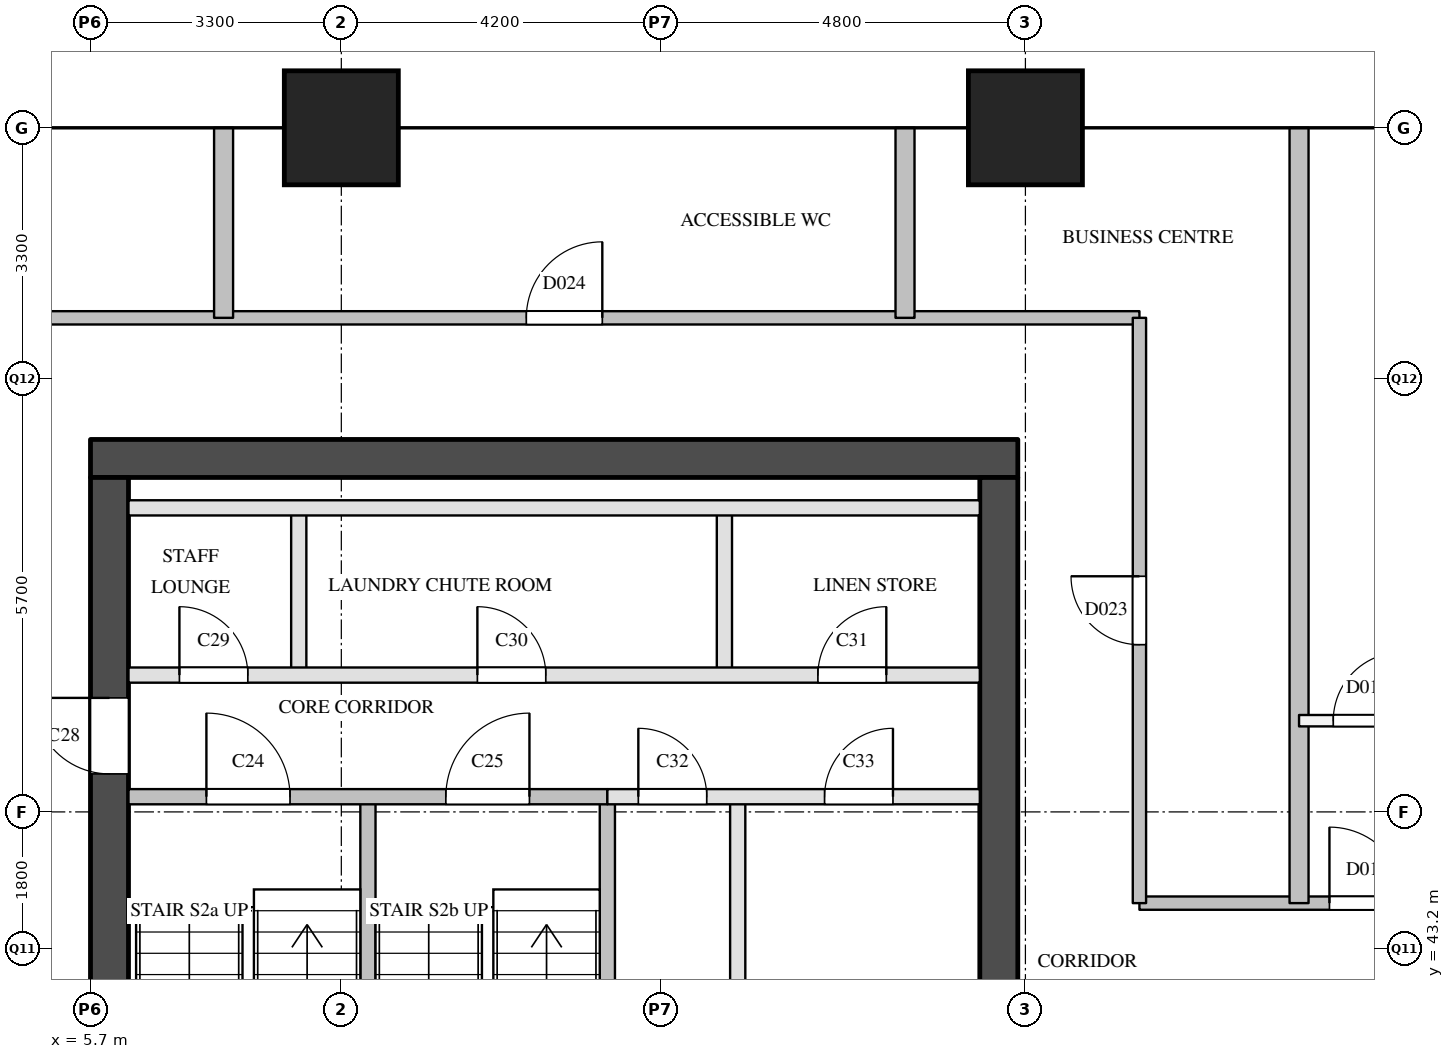
"""IFC4 building model, lengths in metres.
Left out: names, types, materials, properties, quantities, classifications, styles, units other than length and angle.
Written with IfcOpenShell. Run it as: python <this file> out.ifc"""

import sys

from ifc_helpers import new_model, si_unit, direction, frame, frame_2d, origin, origin_2d, place, context, subcontext, project, spatial, rectangle, extrude, element, fill, save


model = new_model("IFC4")
c1 = context("Model", 3, precision=1e-05, world=origin(), true_north=direction((0.0, 1.0)))
c2 = subcontext(c1, "Body", "Model", "MODEL_VIEW")
j1 = project(units=[si_unit("LENGTHUNIT", "METRE"), si_unit("PLANEANGLEUNIT", "RADIAN")], contexts=[c1])
p1 = place(None, origin())
s1 = spatial("IfcSite", under=j1, at=p1, CompositionType="ELEMENT")
p2 = place(p1, origin())
s2 = spatial("IfcBuilding", under=s1, at=p2, CompositionType="ELEMENT")
p3 = place(p2, frame((0.0, 0.0, 193.4)))
s3 = spatial("IfcBuildingStorey", under=s2, at=p3, CompositionType="ELEMENT", Elevation=193.4)
for number, where, z_axis, x_axis in (
    (1, (9.0, 54.0, 0.0), (0.0, 0.0, 1.0), (1.0, 0.0, 0.0)),
    (2, (18.0, 54.0, 0.0), (0.0, 0.0, 1.0), (1.0, 0.0, 0.0)),
):
    element("IfcColumn", number, at=place(p3, frame(where, z_axis=z_axis, x_axis=x_axis)), inside=s3, PredefinedType="COLUMN", context=c2, shape_type="SweptSolid", body=[
        extrude(rectangle(XDim=1.5, YDim=1.5, at=origin_2d()), origin(), (0.0, 0.0, 1.0), 3.9),
    ])
p4 = place(p3, frame((5.7, 49.65, 0.0), z_axis=(0.0, 0.0, 1.0), x_axis=(1.0, 0.0, 0.0)))
e3 = element("IfcWall", 3, at=p4, inside=s3, PredefinedType="SHEAR", context=c2, shape_type="SweptSolid", body=[
    extrude(rectangle(XDim=12.2, YDim=0.5, at=frame_2d((6.1, 0.0))), origin(), (0.0, 0.0, 1.0), 3.4),
])
p5 = place(p3, frame((5.95, 29.1, 0.0), z_axis=(0.0, 0.0, 1.0), x_axis=(0.0, 1.0, 0.0)))
e4 = element("IfcWall", 4, at=p5, inside=s3, PredefinedType="SHEAR", context=c2, shape_type="SweptSolid", body=[
    extrude(rectangle(XDim=20.3, YDim=0.5, at=frame_2d((10.15, 0.0))), origin(), (0.0, 0.0, 1.0), 3.4),
])
p6 = place(p5, frame((3.45, 0.0, 0.0)))
e5 = element("IfcOpeningElement", 5, at=p6, cuts=e4, PredefinedType="OPENING", context=c2, shape_type="SweptSolid", body=[
    extrude(rectangle(XDim=1.0, YDim=2.1, at=frame_2d((0.5, 1.05))), frame((0.0, 0.26, 0.0), z_axis=(0.0, -1.0, 0.0), x_axis=(1.0, 0.0, 0.0)), (0.0, 0.0, 1.0), 0.52),
])
p7 = place(p5, frame((16.4, 0.0, 0.0)))
e6 = element("IfcOpeningElement", 6, at=p7, cuts=e4, PredefinedType="OPENING", context=c2, shape_type="SweptSolid", body=[
    extrude(rectangle(XDim=1.0, YDim=2.1, at=frame_2d((0.5, 1.05))), frame((0.0, 0.26, 0.0), z_axis=(0.0, -1.0, 0.0), x_axis=(1.0, 0.0, 0.0)), (0.0, 0.0, 1.0), 0.52),
])
p8 = place(p3, frame((17.65, 29.1, 0.0), z_axis=(0.0, 0.0, 1.0), x_axis=(0.0, 1.0, 0.0)))
e7 = element("IfcWall", 7, at=p8, inside=s3, PredefinedType="SHEAR", context=c2, shape_type="SweptSolid", body=[
    extrude(rectangle(XDim=20.3, YDim=0.5, at=frame_2d((10.15, 0.0))), origin(), (0.0, 0.0, 1.0), 3.4),
])
p9 = place(p8, frame((1.25, 0.0, 0.0)))
e8 = element("IfcOpeningElement", 8, at=p9, cuts=e7, PredefinedType="OPENING", context=c2, shape_type="SweptSolid", body=[
    extrude(rectangle(XDim=0.7, YDim=2.1, at=frame_2d((0.35, 1.05))), frame((0.0, 0.26, 0.0), z_axis=(0.0, -1.0, 0.0), x_axis=(1.0, 0.0, 0.0)), (0.0, 0.0, 1.0), 0.52),
])
p10 = place(p8, frame((7.05, 0.0, 0.0)))
e9 = element("IfcOpeningElement", 9, at=p10, cuts=e7, PredefinedType="OPENING", context=c2, shape_type="SweptSolid", body=[
    extrude(rectangle(XDim=0.7, YDim=2.1, at=frame_2d((0.35, 1.05))), frame((0.0, 0.26, 0.0), z_axis=(0.0, -1.0, 0.0), x_axis=(1.0, 0.0, 0.0)), (0.0, 0.0, 1.0), 0.52),
])
p11 = place(p8, frame((3.6, 0.0, 0.0)))
e10 = element("IfcOpeningElement", 10, at=p11, cuts=e7, PredefinedType="OPENING", context=c2, shape_type="SweptSolid", body=[
    extrude(rectangle(XDim=1.8, YDim=2.1, at=frame_2d((0.9, 1.05))), frame((0.0, 0.26, 0.0), z_axis=(0.0, -1.0, 0.0), x_axis=(1.0, 0.0, 0.0)), (0.0, 0.0, 1.0), 0.52),
])
p12 = place(p3, frame((8.44, 46.8, 0.0), z_axis=(0.0, 0.0, 1.0), x_axis=(0.0, 1.0, 0.0)))
e11 = element("IfcWall", 11, at=p12, inside=s3, PredefinedType="PARTITIONING", context=c2, shape_type="SweptSolid", body=[
    extrude(rectangle(XDim=2.2, YDim=0.2, at=frame_2d((1.1, 0.0))), origin(), (0.0, 0.0, 1.0), 3.4),
])
for number, where, z_axis, x_axis in (
    (12, (9.35, 40.9, 0.0), (0.0, 0.0, 1.0), (0.0, 1.0, 0.0)),
    (13, (12.5, 40.9, 0.0), (0.0, 0.0, 1.0), (0.0, 1.0, 0.0)),
):
    element("IfcWall", number, at=place(p3, frame(where, z_axis=z_axis, x_axis=x_axis)), inside=s3, PredefinedType="SOLIDWALL", context=c2, shape_type="SweptSolid", body=[
        extrude(rectangle(XDim=4.3, YDim=0.2, at=frame_2d((2.15, 0.0))), origin(), (0.0, 0.0, 1.0), 3.4),
    ])
p13 = place(p3, frame((14.04, 46.8, 0.0), z_axis=(0.0, 0.0, 1.0), x_axis=(0.0, 1.0, 0.0)))
e14 = element("IfcWall", 14, at=p13, inside=s3, PredefinedType="PARTITIONING", context=c2, shape_type="SweptSolid", body=[
    extrude(rectangle(XDim=2.2, YDim=0.2, at=frame_2d((1.1, 0.0))), origin(), (0.0, 0.0, 1.0), 3.4),
])
p14 = place(p3, frame((14.215, 39.0, 0.0), z_axis=(0.0, 0.0, 1.0), x_axis=(0.0, 1.0, 0.0)))
e15 = element("IfcWall", 15, at=p14, inside=s3, PredefinedType="PARTITIONING", context=c2, shape_type="SweptSolid", body=[
    extrude(rectangle(XDim=6.2, YDim=0.2, at=frame_2d((3.1, 0.0))), origin(), (0.0, 0.0, 1.0), 3.4),
])
p15 = place(p3, frame((12.5, 45.2, 0.0), z_axis=(0.0, 0.0, 1.0), x_axis=(1.0, 0.0, 0.0)))
e16 = element("IfcWall", 16, at=p15, inside=s3, PredefinedType="PARTITIONING", context=c2, shape_type="SweptSolid", body=[
    extrude(rectangle(XDim=4.9, YDim=0.2, at=frame_2d((2.45, 0.0))), origin(), (0.0, 0.0, 1.0), 3.4),
])
p16 = place(p15, frame((0.407, 0.0, 0.0)))
e17 = element("IfcOpeningElement", 17, at=p16, cuts=e16, PredefinedType="OPENING", context=c2, shape_type="SweptSolid", body=[
    extrude(rectangle(XDim=0.9, YDim=2.1, at=frame_2d((0.45, 1.05))), frame((0.0, 0.11, 0.0), z_axis=(0.0, -1.0, 0.0), x_axis=(1.0, 0.0, 0.0)), (0.0, 0.0, 1.0), 0.22),
])
p17 = place(p15, frame((2.857, 0.0, 0.0)))
e18 = element("IfcOpeningElement", 18, at=p17, cuts=e16, PredefinedType="OPENING", context=c2, shape_type="SweptSolid", body=[
    extrude(rectangle(XDim=0.9, YDim=2.1, at=frame_2d((0.45, 1.05))), frame((0.0, 0.11, 0.0), z_axis=(0.0, -1.0, 0.0), x_axis=(1.0, 0.0, 0.0)), (0.0, 0.0, 1.0), 0.22),
])
p18 = place(p3, frame((6.2, 45.2, 0.0), z_axis=(0.0, 0.0, 1.0), x_axis=(1.0, 0.0, 0.0)))
e19 = element("IfcWall", 19, at=p18, inside=s3, PredefinedType="SOLIDWALL", context=c2, shape_type="SweptSolid", body=[
    extrude(rectangle(XDim=6.3, YDim=0.2, at=frame_2d((3.15, 0.0))), origin(), (0.0, 0.0, 1.0), 3.4),
])
p19 = place(p18, frame((1.025, 0.0, 0.0)))
e20 = element("IfcOpeningElement", 20, at=p19, cuts=e19, PredefinedType="OPENING", context=c2, shape_type="SweptSolid", body=[
    extrude(rectangle(XDim=1.1, YDim=2.1, at=frame_2d((0.55, 1.05))), frame((0.0, 0.11, 0.0), z_axis=(0.0, -1.0, 0.0), x_axis=(1.0, 0.0, 0.0)), (0.0, 0.0, 1.0), 0.22),
])
p20 = place(p18, frame((4.175, 0.0, 0.0)))
e21 = element("IfcOpeningElement", 21, at=p20, cuts=e19, PredefinedType="OPENING", context=c2, shape_type="SweptSolid", body=[
    extrude(rectangle(XDim=1.1, YDim=2.1, at=frame_2d((0.55, 1.05))), frame((0.0, 0.11, 0.0), z_axis=(0.0, -1.0, 0.0), x_axis=(1.0, 0.0, 0.0)), (0.0, 0.0, 1.0), 0.22),
])
p21 = place(p3, frame((6.2, 46.8, 0.0), z_axis=(0.0, 0.0, 1.0), x_axis=(1.0, 0.0, 0.0)))
e22 = element("IfcWall", 22, at=p21, inside=s3, PredefinedType="PARTITIONING", context=c2, shape_type="SweptSolid", body=[
    extrude(rectangle(XDim=11.2, YDim=0.2, at=frame_2d((5.6, 0.0))), origin(), (0.0, 0.0, 1.0), 3.4),
])
p22 = place(p21, frame((0.67, 0.0, 0.0)))
e23 = element("IfcOpeningElement", 23, at=p22, cuts=e22, PredefinedType="OPENING", context=c2, shape_type="SweptSolid", body=[
    extrude(rectangle(XDim=0.9, YDim=2.1, at=frame_2d((0.45, 1.05))), frame((0.0, 0.11, 0.0), z_axis=(0.0, -1.0, 0.0), x_axis=(1.0, 0.0, 0.0)), (0.0, 0.0, 1.0), 0.22),
])
p23 = place(p21, frame((4.59, 0.0, 0.0)))
e24 = element("IfcOpeningElement", 24, at=p23, cuts=e22, PredefinedType="OPENING", context=c2, shape_type="SweptSolid", body=[
    extrude(rectangle(XDim=0.9, YDim=2.1, at=frame_2d((0.45, 1.05))), frame((0.0, 0.11, 0.0), z_axis=(0.0, -1.0, 0.0), x_axis=(1.0, 0.0, 0.0)), (0.0, 0.0, 1.0), 0.22),
])
p24 = place(p21, frame((9.07, 0.0, 0.0)))
e25 = element("IfcOpeningElement", 25, at=p24, cuts=e22, PredefinedType="OPENING", context=c2, shape_type="SweptSolid", body=[
    extrude(rectangle(XDim=0.9, YDim=2.1, at=frame_2d((0.45, 1.05))), frame((0.0, 0.11, 0.0), z_axis=(0.0, -1.0, 0.0), x_axis=(1.0, 0.0, 0.0)), (0.0, 0.0, 1.0), 0.22),
])
p25 = place(p3, frame((6.2, 49.0, 0.0), z_axis=(0.0, 0.0, 1.0), x_axis=(1.0, 0.0, 0.0)))
e26 = element("IfcWall", 26, at=p25, inside=s3, PredefinedType="PARTITIONING", context=c2, shape_type="SweptSolid", body=[
    extrude(rectangle(XDim=11.2, YDim=0.2, at=frame_2d((5.6, 0.0))), origin(), (0.0, 0.0, 1.0), 3.4),
])
p26 = place(p3, frame((19.5, 43.8, 0.0), z_axis=(0.0, 0.0, 1.0), x_axis=(1.0, 0.0, 0.0)))
e27 = element("IfcWall", 27, at=p26, inside=s3, PredefinedType="PARTITIONING", context=c2, shape_type="SweptSolid", body=[
    extrude(rectangle(XDim=15.0, YDim=0.175, at=frame_2d((7.5, 0.0))), origin(), (0.0, 0.0, 1.0), 2.4),
])
p27 = place(p26, frame((2.5, 0.0, 0.0)))
e28 = element("IfcOpeningElement", 28, at=p27, cuts=e27, PredefinedType="OPENING", context=c2, shape_type="SweptSolid", body=[
    extrude(rectangle(XDim=1.0, YDim=2.1, at=frame_2d((0.5, 1.05))), frame((0.0, 0.097, 0.0), z_axis=(0.0, -1.0, 0.0), x_axis=(1.0, 0.0, 0.0)), (0.0, 0.0, 1.0), 0.195),
])
p28 = place(p26, frame((11.5, 0.0, 0.0)))
e29 = element("IfcOpeningElement", 29, at=p28, cuts=e27, PredefinedType="OPENING", context=c2, shape_type="SweptSolid", body=[
    extrude(rectangle(XDim=1.0, YDim=2.1, at=frame_2d((0.5, 1.05))), frame((0.0, 0.097, 0.0), z_axis=(0.0, -1.0, 0.0), x_axis=(1.0, 0.0, 0.0)), (0.0, 0.0, 1.0), 0.195),
])
p29 = place(p3, frame((4.1, 51.5, 0.0), z_axis=(0.0, 0.0, 1.0), x_axis=(1.0, 0.0, 0.0)))
e30 = element("IfcWall", 30, at=p29, inside=s3, PredefinedType="PARTITIONING", context=c2, shape_type="SweptSolid", body=[
    extrude(rectangle(XDim=15.4, YDim=0.175, at=frame_2d((7.7, 0.0))), origin(), (0.0, 0.0, 1.0), 3.4),
])
p30 = place(p29, frame((7.333, 0.0, 0.0)))
e31 = element("IfcOpeningElement", 31, at=p30, cuts=e30, PredefinedType="OPENING", context=c2, shape_type="SweptSolid", body=[
    extrude(rectangle(XDim=1.0, YDim=2.1, at=frame_2d((0.5, 1.05))), frame((0.0, 0.097, 0.0), z_axis=(0.0, -1.0, 0.0), x_axis=(1.0, 0.0, 0.0)), (0.0, 0.0, 1.0), 0.195),
])
p31 = place(p3, frame((19.5, 43.8, 0.0), z_axis=(0.0, 0.0, 1.0), x_axis=(0.0, 1.0, 0.0)))
e32 = element("IfcWall", 32, at=p31, inside=s3, PredefinedType="PARTITIONING", context=c2, shape_type="SweptSolid", body=[
    extrude(rectangle(XDim=7.7, YDim=0.175, at=frame_2d((3.85, 0.0))), origin(), (0.0, 0.0, 1.0), 3.4),
])
p32 = place(p31, frame((3.4, 0.0, 0.0)))
e33 = element("IfcOpeningElement", 33, at=p32, cuts=e32, PredefinedType="OPENING", context=c2, shape_type="SweptSolid", body=[
    extrude(rectangle(XDim=0.9, YDim=2.1, at=frame_2d((0.45, 1.05))), frame((0.0, 0.097, 0.0), z_axis=(0.0, -1.0, 0.0), x_axis=(1.0, 0.0, 0.0)), (0.0, 0.0, 1.0), 0.195),
])
p33 = place(p3, frame((21.6, 46.2, 0.0), z_axis=(0.0, 0.0, 1.0), x_axis=(1.0, 0.0, 0.0)))
e34 = element("IfcWall", 34, at=p33, inside=s3, PredefinedType="PARTITIONING", context=c2, shape_type="SweptSolid", body=[
    extrude(rectangle(XDim=1.8, YDim=0.15, at=frame_2d((0.9, 0.0))), origin(), (0.0, 0.0, 1.0), 3.4),
])
p34 = place(p33, frame((0.45, 0.0, 0.0)))
e35 = element("IfcOpeningElement", 35, at=p34, cuts=e34, PredefinedType="OPENING", context=c2, shape_type="SweptSolid", body=[
    extrude(rectangle(XDim=0.9, YDim=2.1, at=frame_2d((0.45, 1.05))), frame((0.0, 0.085, 0.0), z_axis=(0.0, -1.0, 0.0), x_axis=(1.0, 0.0, 0.0)), (0.0, 0.0, 1.0), 0.17),
])
for number, where, z_axis, x_axis in (
    (36, (7.451, 51.5, 0.0), (0.0, 0.0, 1.0), (0.0, 1.0, 0.0)),
    (37, (16.416, 51.5, 0.0), (0.0, 0.0, 1.0), (0.0, 1.0, 0.0)),
):
    element("IfcWall", number, at=place(p3, frame(where, z_axis=z_axis, x_axis=x_axis)), inside=s3, PredefinedType="PARTITIONING", context=c2, shape_type="SweptSolid", body=[
        extrude(rectangle(XDim=2.5, YDim=0.25, at=frame_2d((1.25, 0.0))), origin(), (0.0, 0.0, 1.0), 2.4),
    ])
p35 = place(p3, frame((21.6, 43.8, 0.0), z_axis=(0.0, 0.0, 1.0), x_axis=(0.0, 1.0, 0.0)))
e38 = element("IfcWall", 38, at=p35, inside=s3, PredefinedType="PARTITIONING", context=c2, shape_type="SweptSolid", body=[
    extrude(rectangle(XDim=10.2, YDim=0.25, at=frame_2d((5.1, 0.0))), origin(), (0.0, 0.0, 1.0), 2.4),
])
p36 = place(p19, origin())
e39 = element("IfcDoor", 39, at=p36, inside=s3, OperationType="SINGLE_SWING_LEFT", PredefinedType="DOOR", context=c2, shape_type="SweptSolid", body=[
    extrude(rectangle(XDim=1.1, YDim=2.1, at=frame_2d((0.55, 1.05))), frame((0.0, 0.025, 0.0), z_axis=(0.0, -1.0, 0.0), x_axis=(1.0, 0.0, 0.0)), (0.0, 0.0, 1.0), 0.05),
])
fill(e20, e39)
p37 = place(p20, origin())
e40 = element("IfcDoor", 40, at=p37, inside=s3, OperationType="SINGLE_SWING_RIGHT", PredefinedType="DOOR", context=c2, shape_type="SweptSolid", body=[
    extrude(rectangle(XDim=1.1, YDim=2.1, at=frame_2d((0.55, 1.05))), frame((0.0, 0.025, 0.0), z_axis=(0.0, -1.0, 0.0), x_axis=(1.0, 0.0, 0.0)), (0.0, 0.0, 1.0), 0.05),
])
fill(e21, e40)
p38 = place(p7, origin())
e41 = element("IfcDoor", 41, at=p38, inside=s3, OperationType="SINGLE_SWING_RIGHT", PredefinedType="DOOR", context=c2, shape_type="SweptSolid", body=[
    extrude(rectangle(XDim=1.0, YDim=2.1, at=frame_2d((0.5, 1.05))), frame((0.0, 0.025, 0.0), z_axis=(0.0, -1.0, 0.0), x_axis=(1.0, 0.0, 0.0)), (0.0, 0.0, 1.0), 0.05),
])
fill(e6, e41)
p39 = place(p22, origin())
e42 = element("IfcDoor", 42, at=p39, inside=s3, OperationType="SINGLE_SWING_LEFT", PredefinedType="DOOR", context=c2, shape_type="SweptSolid", body=[
    extrude(rectangle(XDim=0.9, YDim=2.1, at=frame_2d((0.45, 1.05))), frame((0.0, 0.025, 0.0), z_axis=(0.0, -1.0, 0.0), x_axis=(1.0, 0.0, 0.0)), (0.0, 0.0, 1.0), 0.05),
])
fill(e23, e42)
p40 = place(p23, origin())
e43 = element("IfcDoor", 43, at=p40, inside=s3, OperationType="SINGLE_SWING_LEFT", PredefinedType="DOOR", context=c2, shape_type="SweptSolid", body=[
    extrude(rectangle(XDim=0.9, YDim=2.1, at=frame_2d((0.45, 1.05))), frame((0.0, 0.025, 0.0), z_axis=(0.0, -1.0, 0.0), x_axis=(1.0, 0.0, 0.0)), (0.0, 0.0, 1.0), 0.05),
])
fill(e24, e43)
p41 = place(p24, origin())
e44 = element("IfcDoor", 44, at=p41, inside=s3, OperationType="SINGLE_SWING_RIGHT", PredefinedType="DOOR", context=c2, shape_type="SweptSolid", body=[
    extrude(rectangle(XDim=0.9, YDim=2.1, at=frame_2d((0.45, 1.05))), frame((0.0, 0.025, 0.0), z_axis=(0.0, -1.0, 0.0), x_axis=(1.0, 0.0, 0.0)), (0.0, 0.0, 1.0), 0.05),
])
fill(e25, e44)
p42 = place(p16, origin())
e45 = element("IfcDoor", 45, at=p42, inside=s3, OperationType="SINGLE_SWING_LEFT", PredefinedType="DOOR", context=c2, shape_type="SweptSolid", body=[
    extrude(rectangle(XDim=0.9, YDim=2.1, at=frame_2d((0.45, 1.05))), frame((0.0, 0.025, 0.0), z_axis=(0.0, -1.0, 0.0), x_axis=(1.0, 0.0, 0.0)), (0.0, 0.0, 1.0), 0.05),
])
fill(e17, e45)
p43 = place(p17, origin())
e46 = element("IfcDoor", 46, at=p43, inside=s3, OperationType="SINGLE_SWING_RIGHT", PredefinedType="DOOR", context=c2, shape_type="SweptSolid", body=[
    extrude(rectangle(XDim=0.9, YDim=2.1, at=frame_2d((0.45, 1.05))), frame((0.0, 0.025, 0.0), z_axis=(0.0, -1.0, 0.0), x_axis=(1.0, 0.0, 0.0)), (0.0, 0.0, 1.0), 0.05),
])
fill(e18, e46)
p44 = place(p27, origin())
e47 = element("IfcDoor", 47, at=p44, inside=s3, OperationType="SINGLE_SWING_LEFT", PredefinedType="DOOR", context=c2, shape_type="SweptSolid", body=[
    extrude(rectangle(XDim=1.0, YDim=2.1, at=frame_2d((0.5, 1.05))), frame((0.0, 0.025, 0.0), z_axis=(0.0, -1.0, 0.0), x_axis=(1.0, 0.0, 0.0)), (0.0, 0.0, 1.0), 0.05),
])
fill(e28, e47)
p45 = place(p34, origin())
e48 = element("IfcDoor", 48, at=p45, inside=s3, OperationType="SINGLE_SWING_RIGHT", PredefinedType="DOOR", context=c2, shape_type="SweptSolid", body=[
    extrude(rectangle(XDim=0.9, YDim=2.1, at=frame_2d((0.45, 1.05))), frame((0.0, 0.025, 0.0), z_axis=(0.0, -1.0, 0.0), x_axis=(1.0, 0.0, 0.0)), (0.0, 0.0, 1.0), 0.05),
])
fill(e35, e48)
p46 = place(p32, origin())
e49 = element("IfcDoor", 49, at=p46, inside=s3, OperationType="SINGLE_SWING_RIGHT", PredefinedType="DOOR", context=c2, shape_type="SweptSolid", body=[
    extrude(rectangle(XDim=0.9, YDim=2.1, at=frame_2d((0.45, 1.05))), frame((0.0, 0.025, 0.0), z_axis=(0.0, -1.0, 0.0), x_axis=(1.0, 0.0, 0.0)), (0.0, 0.0, 1.0), 0.05),
])
fill(e33, e49)
p47 = place(p30, origin())
e50 = element("IfcDoor", 50, at=p47, inside=s3, OperationType="SINGLE_SWING_RIGHT", PredefinedType="DOOR", context=c2, shape_type="SweptSolid", body=[
    extrude(rectangle(XDim=1.0, YDim=2.1, at=frame_2d((0.5, 1.05))), frame((0.0, 0.025, 0.0), z_axis=(0.0, -1.0, 0.0), x_axis=(1.0, 0.0, 0.0)), (0.0, 0.0, 1.0), 0.05),
])
fill(e31, e50)
save(model, sys.argv[1])
